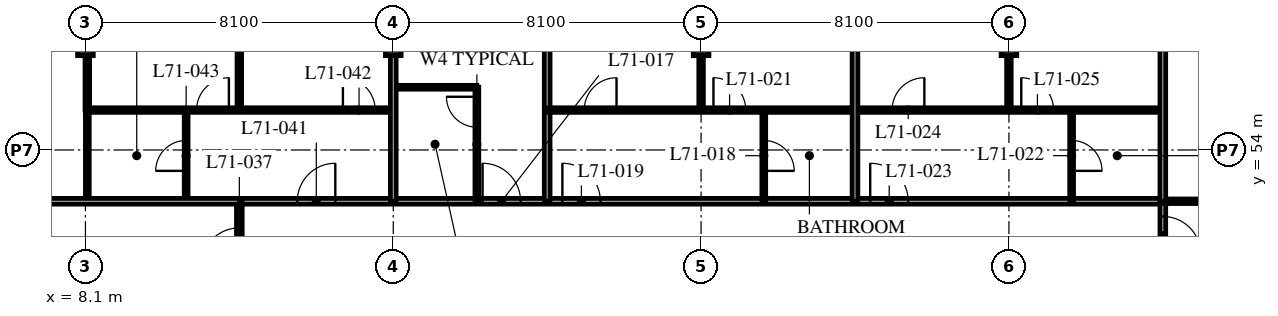
"""IFC4 building model, lengths in metres.
Left out: names, types, materials, properties, quantities, classifications, styles, units other than length and angle.
Written with IfcOpenShell. Run it as: python <this file> out.ifc"""

import sys

from ifc_helpers import new_model, si_unit, direction, frame, frame_2d, origin, origin_2d, place, context, subcontext, project, spatial, rectangle, i_section, extrude, element, fill, save


model = new_model("IFC4")
c1 = context("Model", 3, precision=1e-05, world=origin(), true_north=direction((0.0, 1.0)))
c2 = subcontext(c1, "Body", "Model", "MODEL_VIEW")
j1 = project(units=[si_unit("LENGTHUNIT", "METRE"), si_unit("PLANEANGLEUNIT", "RADIAN")], contexts=[c1])
p1 = place(None, origin())
s1 = spatial("IfcSite", under=j1, at=p1, CompositionType="ELEMENT")
p2 = place(p1, origin())
s2 = spatial("IfcBuilding", under=s1, at=p2, CompositionType="ELEMENT")
p3 = place(p2, frame((0.0, 0.0, 277.5)))
s3 = spatial("IfcBuildingStorey", under=s2, at=p3, CompositionType="ELEMENT", Elevation=277.5)
for number, where, z_axis, x_axis in (
    (1, (8.1, 56.7, 0.0), (0.0, 0.0, 1.0), (1.0, 0.0, 0.0)),
    (2, (16.2, 56.7, 0.0), (0.0, 0.0, 1.0), (1.0, 0.0, 0.0)),
    (3, (24.3, 56.7, 0.0), (0.0, 0.0, 1.0), (1.0, 0.0, 0.0)),
    (4, (32.4, 56.7, 0.0), (0.0, 0.0, 1.0), (1.0, 0.0, 0.0)),
):
    element("IfcColumn", number, at=place(p3, frame(where, z_axis=z_axis, x_axis=x_axis)), inside=s3, PredefinedType="COLUMN", context=c2, shape_type="SweptSolid", body=[
        extrude(i_section(OverallWidth=0.412, OverallDepth=0.437, WebThickness=0.036, FlangeThickness=0.058, FilletRadius=0.015, at=origin_2d()), origin(), (0.0, 0.0, 1.0), 3.9),
    ])
p4 = place(p3, frame((12.15, 52.65, 0.0), z_axis=(0.0, 0.0, 1.0), x_axis=(1.0, 0.0, 0.0)))
e5 = element("IfcWall", 5, at=p4, inside=s3, PredefinedType="PARTITIONING", context=c2, shape_type="SweptSolid", body=[
    extrude(rectangle(XDim=24.3, YDim=0.15, at=frame_2d((12.15, 0.0))), origin(), (0.0, 0.0, 1.0), 3.69),
])
p5 = place(p4, frame((6.4, 0.0, 0.0)))
e6 = element("IfcOpeningElement", 6, at=p5, cuts=e5, PredefinedType="OPENING", context=c2, shape_type="SweptSolid", body=[
    extrude(rectangle(XDim=1.0, YDim=2.1, at=frame_2d((0.5, 1.05))), frame((0.0, 0.085, 0.0), z_axis=(0.0, -1.0, 0.0), x_axis=(1.0, 0.0, 0.0)), (0.0, 0.0, 1.0), 0.17),
])
p6 = place(p4, frame((8.5, 0.0, 0.0)))
e7 = element("IfcOpeningElement", 7, at=p6, cuts=e5, PredefinedType="OPENING", context=c2, shape_type="SweptSolid", body=[
    extrude(rectangle(XDim=1.0, YDim=2.1, at=frame_2d((0.5, 1.05))), frame((0.0, 0.085, 0.0), z_axis=(0.0, -1.0, 0.0), x_axis=(1.0, 0.0, 0.0)), (0.0, 0.0, 1.0), 0.17),
])
p7 = place(p4, frame((16.6, 0.0, 0.0)))
e8 = element("IfcOpeningElement", 8, at=p7, cuts=e5, PredefinedType="OPENING", context=c2, shape_type="SweptSolid", body=[
    extrude(rectangle(XDim=1.0, YDim=2.1, at=frame_2d((0.5, 1.05))), frame((0.0, 0.085, 0.0), z_axis=(0.0, -1.0, 0.0), x_axis=(1.0, 0.0, 0.0)), (0.0, 0.0, 1.0), 0.17),
])
p8 = place(p4, frame((1.525, 0.0, 0.0)))
e9 = element("IfcOpeningElement", 9, at=p8, cuts=e5, PredefinedType="OPENING", context=c2, shape_type="SweptSolid", body=[
    extrude(rectangle(XDim=1.0, YDim=2.1, at=frame_2d((0.5, 1.05))), frame((0.0, 0.085, 0.0), z_axis=(0.0, -1.0, 0.0), x_axis=(1.0, 0.0, 0.0)), (0.0, 0.0, 1.0), 0.17),
])
p9 = place(p3, frame((12.15, 22.5, 0.0), z_axis=(0.0, 0.0, 1.0), x_axis=(0.0, 1.0, 0.0)))
e10 = element("IfcWall", 10, at=p9, inside=s3, PredefinedType="PARTITIONING", context=c2, shape_type="SweptSolid", body=[
    extrude(rectangle(XDim=30.15, YDim=0.15, at=frame_2d((15.075, 0.0))), origin(), (0.0, 0.0, 1.0), 3.69),
])
p10 = place(p9, frame((0.4, 0.0, 0.0)))
e11 = element("IfcOpeningElement", 11, at=p10, cuts=e10, PredefinedType="OPENING", context=c2, shape_type="SweptSolid", body=[
    extrude(rectangle(XDim=1.0, YDim=2.1, at=frame_2d((0.5, 1.05))), frame((0.0, 0.085, 0.0), z_axis=(0.0, -1.0, 0.0), x_axis=(1.0, 0.0, 0.0)), (0.0, 0.0, 1.0), 0.17),
])
p11 = place(p9, frame((18.4, 0.0, 0.0)))
e12 = element("IfcOpeningElement", 12, at=p11, cuts=e10, PredefinedType="OPENING", context=c2, shape_type="SweptSolid", body=[
    extrude(rectangle(XDim=1.0, YDim=2.1, at=frame_2d((0.5, 1.05))), frame((0.0, 0.085, 0.0), z_axis=(0.0, -1.0, 0.0), x_axis=(1.0, 0.0, 0.0)), (0.0, 0.0, 1.0), 0.17),
])
p12 = place(p9, frame((28.45, 0.0, 0.0)))
e13 = element("IfcOpeningElement", 13, at=p12, cuts=e10, PredefinedType="OPENING", context=c2, shape_type="SweptSolid", body=[
    extrude(rectangle(XDim=1.0, YDim=2.1, at=frame_2d((0.5, 1.05))), frame((0.0, 0.085, 0.0), z_axis=(0.0, -1.0, 0.0), x_axis=(1.0, 0.0, 0.0)), (0.0, 0.0, 1.0), 0.17),
])
p13 = place(p3, frame((36.45, 50.85, 0.0), z_axis=(0.0, 0.0, 1.0), x_axis=(0.0, 1.0, 0.0)))
e14 = element("IfcWall", 14, at=p13, inside=s3, PredefinedType="PARTITIONING", context=c2, shape_type="SweptSolid", body=[
    extrude(rectangle(XDim=1.8, YDim=0.15, at=frame_2d((0.9, 0.0))), origin(), (0.0, 0.0, 1.0), 3.69),
])
p14 = place(p13, frame((0.4, 0.0, 0.0)))
e15 = element("IfcOpeningElement", 15, at=p14, cuts=e14, PredefinedType="OPENING", context=c2, shape_type="SweptSolid", body=[
    extrude(rectangle(XDim=1.0, YDim=2.1, at=frame_2d((0.5, 1.05))), frame((0.0, 0.085, 0.0), z_axis=(0.0, -1.0, 0.0), x_axis=(1.0, 0.0, 0.0)), (0.0, 0.0, 1.0), 0.17),
])
p15 = place(p3, frame((16.2, 55.65, 0.0), z_axis=(0.0, 0.0, 1.0), x_axis=(1.0, 0.0, 0.0)))
e16 = element("IfcWall", 16, at=p15, inside=s3, PredefinedType="PARTITIONING", context=c2, shape_type="SweptSolid", body=[
    extrude(rectangle(XDim=2.2, YDim=0.1, at=frame_2d((1.1, 0.0))), origin(), (0.0, 0.0, 1.0), 3.69),
])
p16 = place(p3, frame((18.4, 52.65, 0.0), z_axis=(0.0, 0.0, 1.0), x_axis=(0.0, 1.0, 0.0)))
e17 = element("IfcWall", 17, at=p16, inside=s3, PredefinedType="PARTITIONING", context=c2, shape_type="SweptSolid", body=[
    extrude(rectangle(XDim=3.0, YDim=0.1, at=frame_2d((1.5, 0.0))), origin(), (0.0, 0.0, 1.0), 3.69),
])
p17 = place(p16, frame((1.95, 0.0, 0.0)))
e18 = element("IfcOpeningElement", 18, at=p17, cuts=e17, PredefinedType="OPENING", context=c2, shape_type="SweptSolid", body=[
    extrude(rectangle(XDim=0.8, YDim=2.1, at=frame_2d((0.4, 1.05))), frame((0.0, 0.06, 0.0), z_axis=(0.0, -1.0, 0.0), x_axis=(1.0, 0.0, 0.0)), (0.0, 0.0, 1.0), 0.12),
])
p18 = place(p3, frame((20.25, 52.65, 0.0), z_axis=(0.0, 0.0, 1.0), x_axis=(0.0, 1.0, 0.0)))
e19 = element("IfcWall", 19, at=p18, inside=s3, PredefinedType="PARTITIONING", context=c2, shape_type="SweptSolid", body=[
    extrude(rectangle(XDim=11.85, YDim=0.15, at=frame_2d((5.925, 0.0))), origin(), (0.0, 0.0, 1.0), 3.69),
])
p19 = place(p3, frame((20.25, 55.05, 0.0), z_axis=(0.0, 0.0, 1.0), x_axis=(1.0, 0.0, 0.0)))
e20 = element("IfcWall", 20, at=p19, inside=s3, PredefinedType="PARTITIONING", context=c2, shape_type="SweptSolid", body=[
    extrude(rectangle(XDim=16.2, YDim=0.12, at=frame_2d((8.1, 0.0))), origin(), (0.0, 0.0, 1.0), 3.69),
])
p20 = place(p19, frame((0.975, 0.0, 0.0)))
e21 = element("IfcOpeningElement", 21, at=p20, cuts=e20, PredefinedType="OPENING", context=c2, shape_type="SweptSolid", body=[
    extrude(rectangle(XDim=0.85, YDim=2.1, at=frame_2d((0.425, 1.05))), frame((0.0, 0.07, 0.0), z_axis=(0.0, -1.0, 0.0), x_axis=(1.0, 0.0, 0.0)), (0.0, 0.0, 1.0), 0.14),
])
p21 = place(p19, frame((4.375, 0.0, 0.0)))
e22 = element("IfcOpeningElement", 22, at=p21, cuts=e20, PredefinedType="OPENING", context=c2, shape_type="SweptSolid", body=[
    extrude(rectangle(XDim=0.85, YDim=2.1, at=frame_2d((0.425, 1.05))), frame((0.0, 0.07, 0.0), z_axis=(0.0, -1.0, 0.0), x_axis=(1.0, 0.0, 0.0)), (0.0, 0.0, 1.0), 0.14),
])
p22 = place(p19, frame((9.075, 0.0, 0.0)))
e23 = element("IfcOpeningElement", 23, at=p22, cuts=e20, PredefinedType="OPENING", context=c2, shape_type="SweptSolid", body=[
    extrude(rectangle(XDim=0.85, YDim=2.1, at=frame_2d((0.425, 1.05))), frame((0.0, 0.07, 0.0), z_axis=(0.0, -1.0, 0.0), x_axis=(1.0, 0.0, 0.0)), (0.0, 0.0, 1.0), 0.14),
])
p23 = place(p19, frame((12.475, 0.0, 0.0)))
e24 = element("IfcOpeningElement", 24, at=p23, cuts=e20, PredefinedType="OPENING", context=c2, shape_type="SweptSolid", body=[
    extrude(rectangle(XDim=0.85, YDim=2.1, at=frame_2d((0.425, 1.05))), frame((0.0, 0.07, 0.0), z_axis=(0.0, -1.0, 0.0), x_axis=(1.0, 0.0, 0.0)), (0.0, 0.0, 1.0), 0.14),
])
p24 = place(p3, frame((25.95, 52.65, 0.0), z_axis=(0.0, 0.0, 1.0), x_axis=(0.0, 1.0, 0.0)))
e25 = element("IfcWall", 25, at=p24, inside=s3, PredefinedType="PARTITIONING", context=c2, shape_type="SweptSolid", body=[
    extrude(rectangle(XDim=2.4, YDim=0.1, at=frame_2d((1.2, 0.0))), origin(), (0.0, 0.0, 1.0), 3.69),
])
p25 = place(p24, frame((0.8, 0.0, 0.0)))
e26 = element("IfcOpeningElement", 26, at=p25, cuts=e25, PredefinedType="OPENING", context=c2, shape_type="SweptSolid", body=[
    extrude(rectangle(XDim=0.8, YDim=2.1, at=frame_2d((0.4, 1.05))), frame((0.0, 0.06, 0.0), z_axis=(0.0, -1.0, 0.0), x_axis=(1.0, 0.0, 0.0)), (0.0, 0.0, 1.0), 0.12),
])
p26 = place(p3, frame((24.3, 55.05, 0.0), z_axis=(0.0, 0.0, 1.0), x_axis=(0.0, 1.0, 0.0)))
e27 = element("IfcWall", 27, at=p26, inside=s3, PredefinedType="PARTITIONING", context=c2, shape_type="SweptSolid", body=[
    extrude(rectangle(XDim=9.45, YDim=0.12, at=frame_2d((4.725, 0.0))), origin(), (0.0, 0.0, 1.0), 3.078),
])
p27 = place(p3, frame((28.35, 52.65, 0.0), z_axis=(0.0, 0.0, 1.0), x_axis=(0.0, 1.0, 0.0)))
e28 = element("IfcWall", 28, at=p27, inside=s3, PredefinedType="PARTITIONING", context=c2, shape_type="SweptSolid", body=[
    extrude(rectangle(XDim=11.85, YDim=0.15, at=frame_2d((5.925, 0.0))), origin(), (0.0, 0.0, 1.0), 3.69),
])
p28 = place(p3, frame((34.05, 52.65, 0.0), z_axis=(0.0, 0.0, 1.0), x_axis=(0.0, 1.0, 0.0)))
e29 = element("IfcWall", 29, at=p28, inside=s3, PredefinedType="PARTITIONING", context=c2, shape_type="SweptSolid", body=[
    extrude(rectangle(XDim=2.4, YDim=0.1, at=frame_2d((1.2, 0.0))), origin(), (0.0, 0.0, 1.0), 3.69),
])
p29 = place(p28, frame((0.8, 0.0, 0.0)))
e30 = element("IfcOpeningElement", 30, at=p29, cuts=e29, PredefinedType="OPENING", context=c2, shape_type="SweptSolid", body=[
    extrude(rectangle(XDim=0.8, YDim=2.1, at=frame_2d((0.4, 1.05))), frame((0.0, 0.06, 0.0), z_axis=(0.0, -1.0, 0.0), x_axis=(1.0, 0.0, 0.0)), (0.0, 0.0, 1.0), 0.12),
])
p30 = place(p3, frame((32.4, 55.05, 0.0), z_axis=(0.0, 0.0, 1.0), x_axis=(0.0, 1.0, 0.0)))
e31 = element("IfcWall", 31, at=p30, inside=s3, PredefinedType="PARTITIONING", context=c2, shape_type="SweptSolid", body=[
    extrude(rectangle(XDim=9.45, YDim=0.12, at=frame_2d((4.725, 0.0))), origin(), (0.0, 0.0, 1.0), 3.078),
])
p31 = place(p3, frame((10.75, 52.65, 0.0), z_axis=(0.0, 0.0, 1.0), x_axis=(0.0, 1.0, 0.0)))
e32 = element("IfcWall", 32, at=p31, inside=s3, PredefinedType="PARTITIONING", context=c2, shape_type="SweptSolid", body=[
    extrude(rectangle(XDim=2.4, YDim=0.1, at=frame_2d((1.2, 0.0))), origin(), (0.0, 0.0, 1.0), 3.69),
])
p32 = place(p31, frame((0.8, 0.0, 0.0)))
e33 = element("IfcOpeningElement", 33, at=p32, cuts=e32, PredefinedType="OPENING", context=c2, shape_type="SweptSolid", body=[
    extrude(rectangle(XDim=0.8, YDim=2.1, at=frame_2d((0.4, 1.05))), frame((0.0, 0.06, 0.0), z_axis=(0.0, -1.0, 0.0), x_axis=(1.0, 0.0, 0.0)), (0.0, 0.0, 1.0), 0.12),
])
p33 = place(p3, frame((8.15, 52.65, 0.0), z_axis=(0.0, 0.0, 1.0), x_axis=(0.0, 1.0, 0.0)))
e34 = element("IfcWall", 34, at=p33, inside=s3, PredefinedType="PARTITIONING", context=c2, shape_type="SweptSolid", body=[
    extrude(rectangle(XDim=2.4, YDim=0.1, at=frame_2d((1.2, 0.0))), origin(), (0.0, 0.0, 1.0), 3.078),
])
p34 = place(p3, frame((8.15, 55.05, 0.0), z_axis=(0.0, 0.0, 1.0), x_axis=(1.0, 0.0, 0.0)))
e35 = element("IfcWall", 35, at=p34, inside=s3, PredefinedType="PARTITIONING", context=c2, shape_type="SweptSolid", body=[
    extrude(rectangle(XDim=8.05, YDim=0.12, at=frame_2d((4.025, 0.0))), origin(), (0.0, 0.0, 1.0), 3.69),
])
p35 = place(p34, frame((6.725, 0.0, 0.0)))
e36 = element("IfcOpeningElement", 36, at=p35, cuts=e35, PredefinedType="OPENING", context=c2, shape_type="SweptSolid", body=[
    extrude(rectangle(XDim=0.85, YDim=2.1, at=frame_2d((0.425, 1.05))), frame((0.0, 0.07, 0.0), z_axis=(0.0, -1.0, 0.0), x_axis=(1.0, 0.0, 0.0)), (0.0, 0.0, 1.0), 0.14),
])
p36 = place(p34, frame((2.875, 0.0, 0.0)))
e37 = element("IfcOpeningElement", 37, at=p36, cuts=e35, PredefinedType="OPENING", context=c2, shape_type="SweptSolid", body=[
    extrude(rectangle(XDim=0.85, YDim=2.1, at=frame_2d((0.425, 1.05))), frame((0.0, 0.07, 0.0), z_axis=(0.0, -1.0, 0.0), x_axis=(1.0, 0.0, 0.0)), (0.0, 0.0, 1.0), 0.14),
])
p37 = place(p3, frame((12.15, 55.05, 0.0), z_axis=(0.0, 0.0, 1.0), x_axis=(0.0, 1.0, 0.0)))
e38 = element("IfcWall", 38, at=p37, inside=s3, PredefinedType="PARTITIONING", context=c2, shape_type="SweptSolid", body=[
    extrude(rectangle(XDim=9.45, YDim=0.12, at=frame_2d((4.725, 0.0))), origin(), (0.0, 0.0, 1.0), 3.69),
])
p38 = place(p3, frame((0.3, 52.65, 0.0), z_axis=(0.0, 0.0, 1.0), x_axis=(1.0, 0.0, 0.0)))
e39 = element("IfcWall", 39, at=p38, inside=s3, PredefinedType="PARTITIONING", context=c2, shape_type="SweptSolid", body=[
    extrude(rectangle(XDim=11.85, YDim=0.15, at=frame_2d((5.925, 0.0))), origin(), (0.0, 0.0, 1.0), 3.69),
])
p39 = place(p3, frame((16.2, 52.65, 0.0), z_axis=(0.0, 0.0, 1.0), x_axis=(0.0, 1.0, 0.0)))
e40 = element("IfcWall", 40, at=p39, inside=s3, PredefinedType="PARTITIONING", context=c2, shape_type="SweptSolid", body=[
    extrude(rectangle(XDim=11.85, YDim=0.15, at=frame_2d((5.925, 0.0))), origin(), (0.0, 0.0, 1.0), 3.078),
])
p40 = place(p3, frame((36.45, 52.65, 0.0), z_axis=(0.0, 0.0, 1.0), x_axis=(1.0, 0.0, 0.0)))
e41 = element("IfcWall", 41, at=p40, inside=s3, PredefinedType="PARTITIONING", context=c2, shape_type="SweptSolid", body=[
    extrude(rectangle(XDim=6.45, YDim=0.12, at=frame_2d((3.225, 0.0))), origin(), (0.0, 0.0, 1.0), 3.69),
])
p41 = place(p40, frame((2.8, 0.0, 0.0)))
e42 = element("IfcOpeningElement", 42, at=p41, cuts=e41, PredefinedType="OPENING", context=c2, shape_type="SweptSolid", body=[
    extrude(rectangle(XDim=0.85, YDim=2.1, at=frame_2d((0.425, 1.05))), frame((0.0, 0.07, 0.0), z_axis=(0.0, -1.0, 0.0), x_axis=(1.0, 0.0, 0.0)), (0.0, 0.0, 1.0), 0.14),
])
p42 = place(p3, frame((36.45, 64.5, 0.0), z_axis=(0.0, 0.0, 1.0), x_axis=(0.0, -1.0, 0.0)))
e43 = element("IfcWall", 43, at=p42, inside=s3, PredefinedType="PARTITIONING", context=c2, shape_type="SweptSolid", body=[
    extrude(rectangle(XDim=11.85, YDim=0.15, at=frame_2d((5.925, 0.0))), origin(), (0.0, 0.0, 1.0), 3.69),
])
p43 = place(p3, frame((8.15, 55.05, 0.0), z_axis=(0.0, 0.0, 1.0), x_axis=(0.0, 1.0, 0.0)))
e44 = element("IfcWall", 44, at=p43, inside=s3, PredefinedType="PARTITIONING", context=c2, shape_type="SweptSolid", body=[
    extrude(rectangle(XDim=1.447, YDim=0.12, at=frame_2d((0.724, 0.0))), origin(), (0.0, 0.0, 1.0), 3.078),
])
p44 = place(p17, origin())
e45 = element("IfcDoor", 45, at=p44, inside=s3, OperationType="SINGLE_SWING_RIGHT", PredefinedType="DOOR", context=c2, shape_type="SweptSolid", body=[
    extrude(rectangle(XDim=0.8, YDim=2.1, at=frame_2d((0.4, 1.05))), frame((0.0, 0.025, 0.0), z_axis=(0.0, -1.0, 0.0), x_axis=(1.0, 0.0, 0.0)), (0.0, 0.0, 1.0), 0.05),
])
fill(e18, e45)
p45 = place(p5, origin())
e46 = element("IfcDoor", 46, at=p45, inside=s3, OperationType="SINGLE_SWING_LEFT", PredefinedType="DOOR", context=c2, shape_type="SweptSolid", body=[
    extrude(rectangle(XDim=1.0, YDim=2.1, at=frame_2d((0.5, 1.05))), frame((0.0, 0.025, 0.0), z_axis=(0.0, -1.0, 0.0), x_axis=(1.0, 0.0, 0.0)), (0.0, 0.0, 1.0), 0.05),
])
fill(e6, e46)
p46 = place(p25, origin())
e47 = element("IfcDoor", 47, at=p46, inside=s3, OperationType="SINGLE_SWING_RIGHT", PredefinedType="DOOR", context=c2, shape_type="SweptSolid", body=[
    extrude(rectangle(XDim=0.8, YDim=2.1, at=frame_2d((0.4, 1.05))), frame((0.0, 0.025, 0.0), z_axis=(0.0, -1.0, 0.0), x_axis=(1.0, 0.0, 0.0)), (0.0, 0.0, 1.0), 0.05),
])
fill(e26, e47)
p47 = place(p6, origin())
e48 = element("IfcDoor", 48, at=p47, inside=s3, OperationType="SINGLE_SWING_LEFT", PredefinedType="DOOR", context=c2, shape_type="SweptSolid", body=[
    extrude(rectangle(XDim=1.0, YDim=2.1, at=frame_2d((0.5, 1.05))), frame((0.0, 0.025, 0.0), z_axis=(0.0, -1.0, 0.0), x_axis=(1.0, 0.0, 0.0)), (0.0, 0.0, 1.0), 0.05),
])
fill(e7, e48)
p48 = place(p20, origin())
e49 = element("IfcDoor", 49, at=p48, inside=s3, OperationType="SINGLE_SWING_RIGHT", PredefinedType="DOOR", context=c2, shape_type="SweptSolid", body=[
    extrude(rectangle(XDim=0.85, YDim=2.1, at=frame_2d((0.425, 1.05))), frame((0.0, 0.025, 0.0), z_axis=(0.0, -1.0, 0.0), x_axis=(1.0, 0.0, 0.0)), (0.0, 0.0, 1.0), 0.05),
])
fill(e21, e49)
p49 = place(p21, origin())
e50 = element("IfcDoor", 50, at=p49, inside=s3, OperationType="SINGLE_SWING_LEFT", PredefinedType="DOOR", context=c2, shape_type="SweptSolid", body=[
    extrude(rectangle(XDim=0.85, YDim=2.1, at=frame_2d((0.425, 1.05))), frame((0.0, 0.025, 0.0), z_axis=(0.0, -1.0, 0.0), x_axis=(1.0, 0.0, 0.0)), (0.0, 0.0, 1.0), 0.05),
])
fill(e22, e50)
p50 = place(p29, origin())
e51 = element("IfcDoor", 51, at=p50, inside=s3, OperationType="SINGLE_SWING_RIGHT", PredefinedType="DOOR", context=c2, shape_type="SweptSolid", body=[
    extrude(rectangle(XDim=0.8, YDim=2.1, at=frame_2d((0.4, 1.05))), frame((0.0, 0.025, 0.0), z_axis=(0.0, -1.0, 0.0), x_axis=(1.0, 0.0, 0.0)), (0.0, 0.0, 1.0), 0.05),
])
fill(e30, e51)
p51 = place(p7, origin())
e52 = element("IfcDoor", 52, at=p51, inside=s3, OperationType="SINGLE_SWING_LEFT", PredefinedType="DOOR", context=c2, shape_type="SweptSolid", body=[
    extrude(rectangle(XDim=1.0, YDim=2.1, at=frame_2d((0.5, 1.05))), frame((0.0, 0.025, 0.0), z_axis=(0.0, -1.0, 0.0), x_axis=(1.0, 0.0, 0.0)), (0.0, 0.0, 1.0), 0.05),
])
fill(e8, e52)
p52 = place(p22, origin())
e53 = element("IfcDoor", 53, at=p52, inside=s3, OperationType="SINGLE_SWING_RIGHT", PredefinedType="DOOR", context=c2, shape_type="SweptSolid", body=[
    extrude(rectangle(XDim=0.85, YDim=2.1, at=frame_2d((0.425, 1.05))), frame((0.0, 0.025, 0.0), z_axis=(0.0, -1.0, 0.0), x_axis=(1.0, 0.0, 0.0)), (0.0, 0.0, 1.0), 0.05),
])
fill(e23, e53)
p53 = place(p23, origin())
e54 = element("IfcDoor", 54, at=p53, inside=s3, OperationType="SINGLE_SWING_LEFT", PredefinedType="DOOR", context=c2, shape_type="SweptSolid", body=[
    extrude(rectangle(XDim=0.85, YDim=2.1, at=frame_2d((0.425, 1.05))), frame((0.0, 0.025, 0.0), z_axis=(0.0, -1.0, 0.0), x_axis=(1.0, 0.0, 0.0)), (0.0, 0.0, 1.0), 0.05),
])
fill(e24, e54)
p54 = place(p12, origin())
e55 = element("IfcDoor", 55, at=p54, inside=s3, OperationType="SINGLE_SWING_LEFT", PredefinedType="DOOR", context=c2, shape_type="SweptSolid", body=[
    extrude(rectangle(XDim=1.0, YDim=2.1, at=frame_2d((0.5, 1.05))), frame((0.0, 0.025, 0.0), z_axis=(0.0, -1.0, 0.0), x_axis=(1.0, 0.0, 0.0)), (0.0, 0.0, 1.0), 0.05),
])
fill(e13, e55)
p55 = place(p8, origin())
e56 = element("IfcDoor", 56, at=p55, inside=s3, OperationType="SINGLE_SWING_RIGHT", PredefinedType="DOOR", context=c2, shape_type="SweptSolid", body=[
    extrude(rectangle(XDim=1.0, YDim=2.1, at=frame_2d((0.5, 1.05))), frame((0.0, 0.025, 0.0), z_axis=(0.0, -1.0, 0.0), x_axis=(1.0, 0.0, 0.0)), (0.0, 0.0, 1.0), 0.05),
])
fill(e9, e56)
p56 = place(p35, origin())
e57 = element("IfcDoor", 57, at=p56, inside=s3, OperationType="SINGLE_SWING_LEFT", PredefinedType="DOOR", context=c2, shape_type="SweptSolid", body=[
    extrude(rectangle(XDim=0.85, YDim=2.1, at=frame_2d((0.425, 1.05))), frame((0.0, 0.025, 0.0), z_axis=(0.0, -1.0, 0.0), x_axis=(1.0, 0.0, 0.0)), (0.0, 0.0, 1.0), 0.05),
])
fill(e36, e57)
p57 = place(p32, origin())
e58 = element("IfcDoor", 58, at=p57, inside=s3, OperationType="SINGLE_SWING_LEFT", PredefinedType="DOOR", context=c2, shape_type="SweptSolid", body=[
    extrude(rectangle(XDim=0.8, YDim=2.1, at=frame_2d((0.4, 1.05))), frame((0.0, 0.025, 0.0), z_axis=(0.0, -1.0, 0.0), x_axis=(1.0, 0.0, 0.0)), (0.0, 0.0, 1.0), 0.05),
])
fill(e33, e58)
p58 = place(p36, origin())
e59 = element("IfcDoor", 59, at=p58, inside=s3, OperationType="SINGLE_SWING_RIGHT", PredefinedType="DOOR", context=c2, shape_type="SweptSolid", body=[
    extrude(rectangle(XDim=0.85, YDim=2.1, at=frame_2d((0.425, 1.05))), frame((0.0, 0.025, 0.0), z_axis=(0.0, -1.0, 0.0), x_axis=(1.0, 0.0, 0.0)), (0.0, 0.0, 1.0), 0.05),
])
fill(e37, e59)
p59 = place(p14, origin())
e60 = element("IfcDoor", 60, at=p59, inside=s3, OperationType="SINGLE_SWING_RIGHT", PredefinedType="DOOR", context=c2, shape_type="SweptSolid", body=[
    extrude(rectangle(XDim=1.0, YDim=2.1, at=frame_2d((0.5, 1.05))), frame((0.0, 0.025, 0.0), z_axis=(0.0, -1.0, 0.0), x_axis=(1.0, 0.0, 0.0)), (0.0, 0.0, 1.0), 0.05),
])
fill(e15, e60)
save(model, sys.argv[1])
